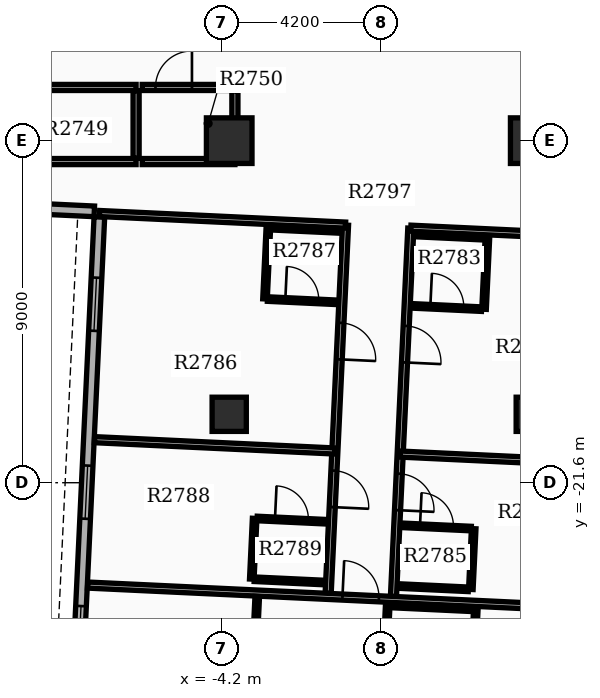
"""IFC4 building model, lengths in metres.
Left out: names, types, materials, properties, quantities, classifications, styles, units other than length and angle.
Written with IfcOpenShell. Run it as: python <this file> out.ifc"""

import sys

from ifc_helpers import new_model, si_unit, direction, frame, frame_2d, origin, origin_2d, place, context, subcontext, project, spatial, rectangle, extrude, element, fill, save


model = new_model("IFC4")
c1 = context("Model", 3, precision=1e-05, world=origin(), true_north=direction((0.0, 1.0)))
c2 = subcontext(c1, "Body", "Model", "MODEL_VIEW")
j1 = project(units=[si_unit("LENGTHUNIT", "METRE"), si_unit("PLANEANGLEUNIT", "RADIAN")], contexts=[c1])
p1 = place(None, origin())
s1 = spatial("IfcSite", under=j1, at=p1, CompositionType="ELEMENT")
p2 = place(p1, origin())
s2 = spatial("IfcBuilding", under=s1, at=p2, CompositionType="ELEMENT")
p3 = place(p2, frame((0.0, 0.0, 172.2)))
s3 = spatial("IfcBuildingStorey", under=s2, at=p3, CompositionType="ELEMENT", Elevation=172.2)
for number, where, z_axis, x_axis in (
    (1, (-4.0, -12.6, 0.0), (0.0, 0.0, 1.0), (1.0, 0.0, 0.0)),
    (2, (4.0, -12.6, 0.0), (0.0, 0.0, 1.0), (1.0, 0.0, 0.0)),
):
    element("IfcColumn", number, at=place(p3, frame(where, z_axis=z_axis, x_axis=x_axis)), inside=s3, PredefinedType="COLUMN", context=c2, shape_type="SweptSolid", body=[
        extrude(rectangle(XDim=1.2, YDim=1.2, at=origin_2d()), origin(), (0.0, 0.0, 1.0), 3.9),
    ])
for number, where, z_axis, x_axis in (
    (3, (-4.0, -19.8, 0.0), (0.0, 0.0, 1.0), (1.0, 0.0, 0.0)),
    (4, (4.0, -19.8, 0.0), (0.0, 0.0, 1.0), (1.0, 0.0, 0.0)),
):
    element("IfcColumn", number, at=place(p3, frame(where, z_axis=z_axis, x_axis=x_axis)), inside=s3, PredefinedType="COLUMN", context=c2, shape_type="SweptSolid", body=[
        extrude(rectangle(XDim=0.9, YDim=0.9, at=origin_2d()), origin(), (0.0, 0.0, 1.0), 3.9),
    ])
p4 = place(p3, frame((-7.416, -14.607, 0.0), z_axis=(0.0, 0.0, 1.0), x_axis=(-0.047103473814, -0.998890015344, 0.0)))
e5 = element("IfcWall", 5, at=p4, inside=s3, PredefinedType="STANDARD", context=c2, shape_type="SweptSolid", body=[
    extrude(rectangle(XDim=20.1, YDim=0.28, at=frame_2d((10.05, 0.0))), origin(), (0.0, 0.0, 1.0), 2.97),
])
p5 = place(p4, frame((1.6, 0.0, 0.8)))
e6 = element("IfcOpeningElement", 6, at=p5, cuts=e5, PredefinedType="OPENING", context=c2, shape_type="SweptSolid", body=[
    extrude(rectangle(XDim=1.4, YDim=1.6, at=frame_2d((0.7, 0.8))), frame((0.0, 0.15, 0.0), z_axis=(0.0, -1.0, 0.0), x_axis=(1.0, 0.0, 0.0)), (0.0, 0.0, 1.0), 0.3),
])
p6 = place(p4, frame((6.55, 0.0, 0.8)))
e7 = element("IfcOpeningElement", 7, at=p6, cuts=e5, PredefinedType="OPENING", context=c2, shape_type="SweptSolid", body=[
    extrude(rectangle(XDim=1.4, YDim=1.6, at=frame_2d((0.7, 0.8))), frame((0.0, 0.15, 0.0), z_axis=(0.0, -1.0, 0.0), x_axis=(1.0, 0.0, 0.0)), (0.0, 0.0, 1.0), 0.3),
])
p7 = place(p4, frame((10.25, 0.0, 0.8)))
e8 = element("IfcOpeningElement", 8, at=p7, cuts=e5, PredefinedType="OPENING", context=c2, shape_type="SweptSolid", body=[
    extrude(rectangle(XDim=1.4, YDim=1.6, at=frame_2d((0.7, 0.8))), frame((0.0, 0.15, 0.0), z_axis=(0.0, -1.0, 0.0), x_axis=(1.0, 0.0, 0.0)), (0.0, 0.0, 1.0), 0.3),
])
p8 = place(p4, frame((13.45, 0.0, 0.8)))
e9 = element("IfcOpeningElement", 9, at=p8, cuts=e5, PredefinedType="OPENING", context=c2, shape_type="SweptSolid", body=[
    extrude(rectangle(XDim=1.4, YDim=1.6, at=frame_2d((0.7, 0.8))), frame((0.0, 0.15, 0.0), z_axis=(0.0, -1.0, 0.0), x_axis=(1.0, 0.0, 0.0)), (0.0, 0.0, 1.0), 0.3),
])
p9 = place(p3, frame((-13.843, -14.164, 0.0), z_axis=(0.0, 0.0, 1.0), x_axis=(0.998889082162, -0.047123258997, 0.0)))
e10 = element("IfcWall", 10, at=p9, inside=s3, PredefinedType="STANDARD", context=c2, shape_type="SweptSolid", body=[
    extrude(rectangle(XDim=6.3, YDim=0.28, at=frame_2d((3.15, 0.0))), origin(), (0.0, 0.0, 1.0), 2.97),
])
p10 = place(p3, frame((-12.4, -13.15, 0.0), z_axis=(0.0, 0.0, 1.0), x_axis=(1.0, 0.0, 0.0)))
e11 = element("IfcWall", 11, at=p10, inside=s3, PredefinedType="PARTITIONING", context=c2, shape_type="SweptSolid", body=[
    extrude(rectangle(XDim=5.95, YDim=0.16, at=frame_2d((2.975, 0.0))), origin(), (0.0, 0.0, 1.0), 2.96),
])
p11 = place(p3, frame((-12.4, -11.2, 0.0), z_axis=(0.0, 0.0, 1.0), x_axis=(1.0, 0.0, 0.0)))
e12 = element("IfcWall", 12, at=p11, inside=s3, PredefinedType="PARTITIONING", context=c2, shape_type="SweptSolid", body=[
    extrude(rectangle(XDim=5.95, YDim=0.16, at=frame_2d((2.975, 0.0))), origin(), (0.0, 0.0, 1.0), 2.96),
])
p12 = place(p11, frame((2.495, 0.0, 0.0)))
e13 = element("IfcOpeningElement", 13, at=p12, cuts=e12, PredefinedType="OPENING", context=c2, shape_type="SweptSolid", body=[
    extrude(rectangle(XDim=0.96, YDim=2.15, at=frame_2d((0.48, 1.075))), frame((0.0, 0.09, 0.0), z_axis=(0.0, -1.0, 0.0), x_axis=(1.0, 0.0, 0.0)), (0.0, 0.0, 1.0), 0.18),
])
p13 = place(p3, frame((-6.45, -13.065, 0.0), z_axis=(0.0, 0.0, 1.0), x_axis=(0.0, 1.0, 0.0)))
e14 = element("IfcWall", 14, at=p13, inside=s3, PredefinedType="PARTITIONING", context=c2, shape_type="SweptSolid", body=[
    extrude(rectangle(XDim=1.78, YDim=0.16, at=frame_2d((0.89, 0.0))), origin(), (0.0, 0.0, 1.0), 2.96),
])
p14 = place(p3, frame((-6.29, -13.15, 0.0), z_axis=(0.0, 0.0, 1.0), x_axis=(1.0, 0.0, 0.0)))
e15 = element("IfcWall", 15, at=p14, inside=s3, PredefinedType="PARTITIONING", context=c2, shape_type="SweptSolid", body=[
    extrude(rectangle(XDim=2.44, YDim=0.16, at=frame_2d((1.22, 0.0))), origin(), (0.0, 0.0, 1.0), 2.96),
])
p15 = place(p3, frame((-6.29, -11.2, 0.0), z_axis=(0.0, 0.0, 1.0), x_axis=(1.0, 0.0, 0.0)))
e16 = element("IfcWall", 16, at=p15, inside=s3, PredefinedType="PARTITIONING", context=c2, shape_type="SweptSolid", body=[
    extrude(rectangle(XDim=2.44, YDim=0.16, at=frame_2d((1.22, 0.0))), origin(), (0.0, 0.0, 1.0), 2.96),
])
p16 = place(p15, frame((0.35, 0.0, 0.0)))
e17 = element("IfcOpeningElement", 17, at=p16, cuts=e16, PredefinedType="OPENING", context=c2, shape_type="SweptSolid", body=[
    extrude(rectangle(XDim=0.96, YDim=2.15, at=frame_2d((0.48, 1.075))), frame((0.0, 0.09, 0.0), z_axis=(0.0, -1.0, 0.0), x_axis=(1.0, 0.0, 0.0)), (0.0, 0.0, 1.0), 0.18),
])
p17 = place(p3, frame((-3.85, -13.065, 0.0), z_axis=(0.0, 0.0, 1.0), x_axis=(0.0, 1.0, 0.0)))
e18 = element("IfcWall", 18, at=p17, inside=s3, PredefinedType="PARTITIONING", context=c2, shape_type="SweptSolid", body=[
    extrude(rectangle(XDim=1.78, YDim=0.16, at=frame_2d((0.89, 0.0))), origin(), (0.0, 0.0, 1.0), 2.96),
])
p18 = place(p3, frame((0.779, -14.903, 0.0), z_axis=(0.0, 0.0, 1.0), x_axis=(-0.047091598416, -0.998890575268, 0.0)))
e19 = element("IfcWall", 19, at=p18, inside=s3, PredefinedType="PARTITIONING", context=c2, shape_type="SweptSolid", body=[
    extrude(rectangle(XDim=9.7, YDim=0.16, at=frame_2d((4.85, 0.0))), origin(), (0.0, 0.0, 1.0), 2.96),
])
p19 = place(p18, frame((2.575, 0.0, 0.0)))
e20 = element("IfcOpeningElement", 20, at=p19, cuts=e19, PredefinedType="OPENING", context=c2, shape_type="SweptSolid", body=[
    extrude(rectangle(XDim=0.96, YDim=2.15, at=frame_2d((0.48, 1.075))), frame((0.0, 0.09, 0.0), z_axis=(0.0, -1.0, 0.0), x_axis=(1.0, 0.0, 0.0)), (0.0, 0.0, 1.0), 0.18),
])
p20 = place(p18, frame((6.467, 0.0, 0.0)))
e21 = element("IfcOpeningElement", 21, at=p20, cuts=e19, PredefinedType="OPENING", context=c2, shape_type="SweptSolid", body=[
    extrude(rectangle(XDim=0.96, YDim=2.15, at=frame_2d((0.48, 1.075))), frame((0.0, 0.09, 0.0), z_axis=(0.0, -1.0, 0.0), x_axis=(1.0, 0.0, 0.0)), (0.0, 0.0, 1.0), 0.18),
])
p21 = place(p3, frame((0.779, -14.903, 0.0), z_axis=(0.0, 0.0, 1.0), x_axis=(0.998889957338, -0.047104703898, 0.0)))
e22 = element("IfcWall", 22, at=p21, inside=s3, PredefinedType="PARTITIONING", context=c2, shape_type="SweptSolid", body=[
    extrude(rectangle(XDim=5.24, YDim=0.16, at=frame_2d((2.62, 0.0))), origin(), (0.0, 0.0, 1.0), 2.96),
])
p22 = place(p3, frame((0.499, -20.847, 0.0), z_axis=(0.0, 0.0, 1.0), x_axis=(0.998891017342, -0.047082220362, 0.0)))
e23 = element("IfcWall", 23, at=p22, inside=s3, PredefinedType="PARTITIONING", context=c2, shape_type="SweptSolid", body=[
    extrude(rectangle(XDim=5.092, YDim=0.16, at=frame_2d((2.546, 0.0))), origin(), (0.0, 0.0, 1.0), 2.96),
])
p23 = place(p3, frame((0.823, -16.948, 0.0), z_axis=(0.0, 0.0, 1.0), x_axis=(0.998891083954, -0.047080807099, 0.0)))
e24 = element("IfcWall", 24, at=p23, inside=s3, PredefinedType="PARTITIONING", context=c2, shape_type="SweptSolid", body=[
    extrude(rectangle(XDim=1.82, YDim=0.12, at=frame_2d((0.91, 0.0))), origin(), (0.0, 0.0, 1.0), 2.96),
])
p24 = place(p23, frame((0.47, 0.0, 0.0)))
e25 = element("IfcOpeningElement", 25, at=p24, cuts=e24, PredefinedType="OPENING", context=c2, shape_type="SweptSolid", body=[
    extrude(rectangle(XDim=0.88, YDim=2.1, at=frame_2d((0.44, 1.05))), frame((0.0, 0.07, 0.0), z_axis=(0.0, -1.0, 0.0), x_axis=(1.0, 0.0, 0.0)), (0.0, 0.0, 1.0), 0.14),
])
p25 = place(p3, frame((0.911, -15.07, 0.0), z_axis=(0.0, 0.0, 1.0), x_axis=(0.998884467853, -0.047220968666, 0.0)))
e26 = element("IfcWall", 26, at=p25, inside=s3, PredefinedType="PARTITIONING", context=c2, shape_type="SweptSolid", body=[
    extrude(rectangle(XDim=1.82, YDim=0.12, at=frame_2d((0.91, 0.0))), origin(), (0.0, 0.0, 1.0), 2.96),
])
p26 = place(p3, frame((2.794, -15.158, 0.0), z_axis=(0.0, 0.0, 1.0), x_axis=(-0.04700985207, -0.998894425757, 0.0)))
e27 = element("IfcWall", 27, at=p26, inside=s3, PredefinedType="PARTITIONING", context=c2, shape_type="SweptSolid", body=[
    extrude(rectangle(XDim=1.88, YDim=0.12, at=frame_2d((0.94, 0.0))), origin(), (0.0, 0.0, 1.0), 2.96),
])
p27 = place(p3, frame((0.55, -22.721, 0.0), z_axis=(0.0, 0.0, 1.0), x_axis=(0.998891083954, -0.047080807099, 0.0)))
e28 = element("IfcWall", 28, at=p27, inside=s3, PredefinedType="PARTITIONING", context=c2, shape_type="SweptSolid", body=[
    extrude(rectangle(XDim=1.82, YDim=0.12, at=frame_2d((0.91, 0.0))), origin(), (0.0, 0.0, 1.0), 2.96),
])
p28 = place(p27, frame((0.47, 0.0, 0.0)))
e29 = element("IfcOpeningElement", 29, at=p28, cuts=e28, PredefinedType="OPENING", context=c2, shape_type="SweptSolid", body=[
    extrude(rectangle(XDim=0.88, YDim=2.1, at=frame_2d((0.44, 1.05))), frame((0.0, 0.07, 0.0), z_axis=(0.0, -1.0, 0.0), x_axis=(1.0, 0.0, 0.0)), (0.0, 0.0, 1.0), 0.14),
])
p29 = place(p3, frame((0.475, -24.319, 0.0), z_axis=(0.0, 0.0, 1.0), x_axis=(0.998891083954, -0.047080807099, 0.0)))
e30 = element("IfcWall", 30, at=p29, inside=s3, PredefinedType="PARTITIONING", context=c2, shape_type="SweptSolid", body=[
    extrude(rectangle(XDim=1.82, YDim=0.12, at=frame_2d((0.91, 0.0))), origin(), (0.0, 0.0, 1.0), 2.96),
])
p30 = place(p3, frame((2.433, -22.81, 0.0), z_axis=(0.0, 0.0, 1.0), x_axis=(-0.046992475174, -0.998895243395, 0.0)))
e31 = element("IfcWall", 31, at=p30, inside=s3, PredefinedType="PARTITIONING", context=c2, shape_type="SweptSolid", body=[
    extrude(rectangle(XDim=1.6, YDim=0.12, at=frame_2d((0.8, 0.0))), origin(), (0.0, 0.0, 1.0), 2.96),
])
p31 = place(p3, frame((-0.939, -14.822, 0.0), z_axis=(0.0, 0.0, 1.0), x_axis=(-0.047116711769, -0.99888939101, 0.0)))
e32 = element("IfcWall", 32, at=p31, inside=s3, PredefinedType="PARTITIONING", context=c2, shape_type="SweptSolid", body=[
    extrude(rectangle(XDim=9.7, YDim=0.16, at=frame_2d((4.85, 0.0))), origin(), (0.0, 0.0, 1.0), 2.96),
])
p32 = place(p31, frame((2.575, 0.0, 0.0)))
e33 = element("IfcOpeningElement", 33, at=p32, cuts=e32, PredefinedType="OPENING", context=c2, shape_type="SweptSolid", body=[
    extrude(rectangle(XDim=0.96, YDim=2.15, at=frame_2d((0.48, 1.075))), frame((0.0, 0.09, 0.0), z_axis=(0.0, -1.0, 0.0), x_axis=(1.0, 0.0, 0.0)), (0.0, 0.0, 1.0), 0.18),
])
p33 = place(p31, frame((6.467, 0.0, 0.0)))
e34 = element("IfcOpeningElement", 34, at=p33, cuts=e32, PredefinedType="OPENING", context=c2, shape_type="SweptSolid", body=[
    extrude(rectangle(XDim=0.96, YDim=2.15, at=frame_2d((0.48, 1.075))), frame((0.0, 0.09, 0.0), z_axis=(0.0, -1.0, 0.0), x_axis=(1.0, 0.0, 0.0)), (0.0, 0.0, 1.0), 0.18),
])
p34 = place(p3, frame((-0.939, -14.822, 0.0), z_axis=(0.0, 0.0, 1.0), x_axis=(-0.998890444558, 0.047094370901, 0.0)))
e35 = element("IfcWall", 35, at=p34, inside=s3, PredefinedType="PARTITIONING", context=c2, shape_type="SweptSolid", body=[
    extrude(rectangle(XDim=6.48, YDim=0.16, at=frame_2d((3.24, 0.0))), origin(), (0.0, 0.0, 1.0), 2.96),
])
p35 = place(p3, frame((-1.219, -20.766, 0.0), z_axis=(0.0, 0.0, 1.0), x_axis=(-0.998889408842, 0.047116333717, 0.0)))
e36 = element("IfcWall", 36, at=p35, inside=s3, PredefinedType="PARTITIONING", context=c2, shape_type="SweptSolid", body=[
    extrude(rectangle(XDim=6.332, YDim=0.16, at=frame_2d((3.166, 0.0))), origin(), (0.0, 0.0, 1.0), 2.96),
])
p36 = place(p3, frame((-2.993, -16.768, 0.0), z_axis=(0.0, 0.0, 1.0), x_axis=(0.998890786574, -0.047087116047, 0.0)))
e37 = element("IfcWall", 37, at=p36, inside=s3, PredefinedType="PARTITIONING", context=c2, shape_type="SweptSolid", body=[
    extrude(rectangle(XDim=1.82, YDim=0.12, at=frame_2d((0.91, 0.0))), origin(), (0.0, 0.0, 1.0), 2.96),
])
p37 = place(p36, frame((0.47, 0.0, 0.0)))
e38 = element("IfcOpeningElement", 38, at=p37, cuts=e37, PredefinedType="OPENING", context=c2, shape_type="SweptSolid", body=[
    extrude(rectangle(XDim=0.88, YDim=2.1, at=frame_2d((0.44, 1.05))), frame((0.0, 0.07, 0.0), z_axis=(0.0, -1.0, 0.0), x_axis=(1.0, 0.0, 0.0)), (0.0, 0.0, 1.0), 0.14),
])
p38 = place(p3, frame((-2.905, -14.89, 0.0), z_axis=(0.0, 0.0, 1.0), x_axis=(0.998890786574, -0.047087116047, 0.0)))
e39 = element("IfcWall", 39, at=p38, inside=s3, PredefinedType="PARTITIONING", context=c2, shape_type="SweptSolid", body=[
    extrude(rectangle(XDim=1.82, YDim=0.12, at=frame_2d((0.91, 0.0))), origin(), (0.0, 0.0, 1.0), 2.96),
])
p39 = place(p3, frame((-2.969, -14.887, 0.0), z_axis=(0.0, 0.0, 1.0), x_axis=(-0.047139425368, -0.998888319371, 0.0)))
e40 = element("IfcWall", 40, at=p39, inside=s3, PredefinedType="PARTITIONING", context=c2, shape_type="SweptSolid", body=[
    extrude(rectangle(XDim=1.88, YDim=0.12, at=frame_2d((0.94, 0.0))), origin(), (0.0, 0.0, 1.0), 2.96),
])
p40 = place(p3, frame((-3.265, -22.541, 0.0), z_axis=(0.0, 0.0, 1.0), x_axis=(0.998890786574, -0.047087116047, 0.0)))
e41 = element("IfcWall", 41, at=p40, inside=s3, PredefinedType="PARTITIONING", context=c2, shape_type="SweptSolid", body=[
    extrude(rectangle(XDim=1.82, YDim=0.12, at=frame_2d((0.91, 0.0))), origin(), (0.0, 0.0, 1.0), 2.96),
])
p41 = place(p40, frame((0.47, 0.0, 0.0)))
e42 = element("IfcOpeningElement", 42, at=p41, cuts=e41, PredefinedType="OPENING", context=c2, shape_type="SweptSolid", body=[
    extrude(rectangle(XDim=0.88, YDim=2.1, at=frame_2d((0.44, 1.05))), frame((0.0, 0.07, 0.0), z_axis=(0.0, -1.0, 0.0), x_axis=(1.0, 0.0, 0.0)), (0.0, 0.0, 1.0), 0.14),
])
p42 = place(p3, frame((-3.341, -24.139, 0.0), z_axis=(0.0, 0.0, 1.0), x_axis=(0.998890786574, -0.047087116047, 0.0)))
e43 = element("IfcWall", 43, at=p42, inside=s3, PredefinedType="PARTITIONING", context=c2, shape_type="SweptSolid", body=[
    extrude(rectangle(XDim=1.82, YDim=0.12, at=frame_2d((0.91, 0.0))), origin(), (0.0, 0.0, 1.0), 2.96),
])
p43 = place(p3, frame((-3.33, -22.538, 0.0), z_axis=(0.0, 0.0, 1.0), x_axis=(-0.047144709581, -0.998888069985, 0.0)))
e44 = element("IfcWall", 44, at=p43, inside=s3, PredefinedType="PARTITIONING", context=c2, shape_type="SweptSolid", body=[
    extrude(rectangle(XDim=1.6, YDim=0.12, at=frame_2d((0.8, 0.0))), origin(), (0.0, 0.0, 1.0), 2.96),
])
p44 = place(p3, frame((-7.725, -24.293, 0.0), z_axis=(0.0, 0.0, 1.0), x_axis=(0.998889967692, -0.047104484326, 0.0)))
e45 = element("IfcWall", 45, at=p44, inside=s3, PredefinedType="PARTITIONING", context=c2, shape_type="SweptSolid", body=[
    extrude(rectangle(XDim=13.144, YDim=0.16, at=frame_2d((6.572, 0.0))), origin(), (0.0, 0.0, 1.0), 2.96),
])
p45 = place(p44, frame((6.712, 0.0, 0.0)))
e46 = element("IfcOpeningElement", 46, at=p45, cuts=e45, PredefinedType="OPENING", context=c2, shape_type="SweptSolid", body=[
    extrude(rectangle(XDim=0.96, YDim=2.15, at=frame_2d((0.48, 1.075))), frame((0.0, 0.09, 0.0), z_axis=(0.0, -1.0, 0.0), x_axis=(1.0, 0.0, 0.0)), (0.0, 0.0, 1.0), 0.18),
])
p46 = place(p3, frame((-3.262, -24.594, 0.0), z_axis=(0.0, 0.0, 1.0), x_axis=(-0.047089343138, -0.998890681588, 0.0)))
e47 = element("IfcWall", 47, at=p46, inside=s3, PredefinedType="PARTITIONING", context=c2, shape_type="SweptSolid", body=[
    extrude(rectangle(XDim=10.312, YDim=0.12, at=frame_2d((5.156, 0.0))), origin(), (0.0, 0.0, 1.0), 2.96),
])
p47 = place(p46, frame((0.7, 0.0, 0.0)))
e48 = element("IfcOpeningElement", 48, at=p47, cuts=e47, PredefinedType="OPENING", context=c2, shape_type="SweptSolid", body=[
    extrude(rectangle(XDim=0.9, YDim=2.1, at=frame_2d((0.45, 1.05))), frame((0.0, 0.07, 0.0), z_axis=(0.0, -1.0, 0.0), x_axis=(1.0, 0.0, 0.0)), (0.0, 0.0, 1.0), 0.14),
])
p48 = place(p3, frame((0.171, -24.826, 0.0), z_axis=(0.0, 0.0, 1.0), x_axis=(-0.047087116047, -0.998890786574, 0.0)))
e49 = element("IfcWall", 49, at=p48, inside=s3, PredefinedType="PARTITIONING", context=c2, shape_type="SweptSolid", body=[
    extrude(rectangle(XDim=1.82, YDim=0.12, at=frame_2d((0.91, 0.0))), origin(), (0.0, 0.0, 1.0), 2.96),
])
p49 = place(p48, frame((0.45, 0.0, 0.0)))
e50 = element("IfcOpeningElement", 50, at=p49, cuts=e49, PredefinedType="OPENING", context=c2, shape_type="SweptSolid", body=[
    extrude(rectangle(XDim=0.88, YDim=2.1, at=frame_2d((0.44, 1.05))), frame((0.0, 0.07, 0.0), z_axis=(0.0, -1.0, 0.0), x_axis=(1.0, 0.0, 0.0)), (0.0, 0.0, 1.0), 0.14),
])
p50 = place(p3, frame((2.488, -24.935, 0.0), z_axis=(0.0, 0.0, 1.0), x_axis=(-0.047214641863, -0.998884766924, 0.0)))
e51 = element("IfcWall", 51, at=p50, inside=s3, PredefinedType="PARTITIONING", context=c2, shape_type="SweptSolid", body=[
    extrude(rectangle(XDim=1.82, YDim=0.12, at=frame_2d((0.91, 0.0))), origin(), (0.0, 0.0, 1.0), 2.96),
])
p51 = place(p3, frame((0.241, -24.829, 0.0), z_axis=(0.0, 0.0, 1.0), x_axis=(0.998887815408, -0.047150103183, 0.0)))
e52 = element("IfcWall", 52, at=p51, inside=s3, PredefinedType="PARTITIONING", context=c2, shape_type="SweptSolid", body=[
    extrude(rectangle(XDim=2.18, YDim=0.12, at=frame_2d((1.09, 0.0))), origin(), (0.0, 0.0, 1.0), 2.96),
])
p52 = place(p5, origin())
e53 = element("IfcWindow", 53, at=p52, inside=s3, PartitioningType="SINGLE_PANEL", PredefinedType="WINDOW", context=c2, shape_type="SweptSolid", body=[
    extrude(rectangle(XDim=1.4, YDim=1.6, at=frame_2d((0.7, 0.8))), frame((0.0, 0.03, 0.0), z_axis=(0.0, -1.0, 0.0), x_axis=(1.0, 0.0, 0.0)), (0.0, 0.0, 1.0), 0.06),
])
fill(e6, e53)
p53 = place(p6, origin())
e54 = element("IfcWindow", 54, at=p53, inside=s3, PartitioningType="SINGLE_PANEL", PredefinedType="WINDOW", context=c2, shape_type="SweptSolid", body=[
    extrude(rectangle(XDim=1.4, YDim=1.6, at=frame_2d((0.7, 0.8))), frame((0.0, 0.03, 0.0), z_axis=(0.0, -1.0, 0.0), x_axis=(1.0, 0.0, 0.0)), (0.0, 0.0, 1.0), 0.06),
])
fill(e7, e54)
p54 = place(p7, origin())
e55 = element("IfcWindow", 55, at=p54, inside=s3, PartitioningType="SINGLE_PANEL", PredefinedType="WINDOW", context=c2, shape_type="SweptSolid", body=[
    extrude(rectangle(XDim=1.4, YDim=1.6, at=frame_2d((0.7, 0.8))), frame((0.0, 0.03, 0.0), z_axis=(0.0, -1.0, 0.0), x_axis=(1.0, 0.0, 0.0)), (0.0, 0.0, 1.0), 0.06),
])
fill(e8, e55)
p55 = place(p16, origin())
e56 = element("IfcDoor", 56, at=p55, inside=s3, OperationType="SINGLE_SWING_RIGHT", PredefinedType="DOOR", context=c2, shape_type="SweptSolid", body=[
    extrude(rectangle(XDim=0.96, YDim=2.15, at=frame_2d((0.48, 1.075))), frame((0.0, 0.025, 0.0), z_axis=(0.0, -1.0, 0.0), x_axis=(1.0, 0.0, 0.0)), (0.0, 0.0, 1.0), 0.05),
])
fill(e17, e56)
p56 = place(p19, origin())
e57 = element("IfcDoor", 57, at=p56, inside=s3, OperationType="SINGLE_SWING_RIGHT", PredefinedType="DOOR", context=c2, shape_type="SweptSolid", body=[
    extrude(rectangle(XDim=0.96, YDim=2.15, at=frame_2d((0.48, 1.075))), frame((0.0, 0.025, 0.0), z_axis=(0.0, -1.0, 0.0), x_axis=(1.0, 0.0, 0.0)), (0.0, 0.0, 1.0), 0.05),
])
fill(e20, e57)
p57 = place(p24, origin())
e58 = element("IfcDoor", 58, at=p57, inside=s3, OperationType="SINGLE_SWING_LEFT", PredefinedType="DOOR", context=c2, shape_type="SweptSolid", body=[
    extrude(rectangle(XDim=0.88, YDim=2.1, at=frame_2d((0.44, 1.05))), frame((0.0, 0.025, 0.0), z_axis=(0.0, -1.0, 0.0), x_axis=(1.0, 0.0, 0.0)), (0.0, 0.0, 1.0), 0.05),
])
fill(e25, e58)
p58 = place(p20, origin())
e59 = element("IfcDoor", 59, at=p58, inside=s3, OperationType="SINGLE_SWING_RIGHT", PredefinedType="DOOR", context=c2, shape_type="SweptSolid", body=[
    extrude(rectangle(XDim=0.96, YDim=2.15, at=frame_2d((0.48, 1.075))), frame((0.0, 0.025, 0.0), z_axis=(0.0, -1.0, 0.0), x_axis=(1.0, 0.0, 0.0)), (0.0, 0.0, 1.0), 0.05),
])
fill(e21, e59)
p59 = place(p28, origin())
e60 = element("IfcDoor", 60, at=p59, inside=s3, OperationType="SINGLE_SWING_LEFT", PredefinedType="DOOR", context=c2, shape_type="SweptSolid", body=[
    extrude(rectangle(XDim=0.88, YDim=2.1, at=frame_2d((0.44, 1.05))), frame((0.0, 0.025, 0.0), z_axis=(0.0, -1.0, 0.0), x_axis=(1.0, 0.0, 0.0)), (0.0, 0.0, 1.0), 0.05),
])
fill(e29, e60)
p60 = place(p32, origin())
e61 = element("IfcDoor", 61, at=p60, inside=s3, OperationType="SINGLE_SWING_RIGHT", PredefinedType="DOOR", context=c2, shape_type="SweptSolid", body=[
    extrude(rectangle(XDim=0.96, YDim=2.15, at=frame_2d((0.48, 1.075))), frame((0.0, 0.025, 0.0), z_axis=(0.0, -1.0, 0.0), x_axis=(1.0, 0.0, 0.0)), (0.0, 0.0, 1.0), 0.05),
])
fill(e33, e61)
p61 = place(p37, origin())
e62 = element("IfcDoor", 62, at=p61, inside=s3, OperationType="SINGLE_SWING_LEFT", PredefinedType="DOOR", context=c2, shape_type="SweptSolid", body=[
    extrude(rectangle(XDim=0.88, YDim=2.1, at=frame_2d((0.44, 1.05))), frame((0.0, 0.025, 0.0), z_axis=(0.0, -1.0, 0.0), x_axis=(1.0, 0.0, 0.0)), (0.0, 0.0, 1.0), 0.05),
])
fill(e38, e62)
p62 = place(p33, origin())
e63 = element("IfcDoor", 63, at=p62, inside=s3, OperationType="SINGLE_SWING_RIGHT", PredefinedType="DOOR", context=c2, shape_type="SweptSolid", body=[
    extrude(rectangle(XDim=0.96, YDim=2.15, at=frame_2d((0.48, 1.075))), frame((0.0, 0.025, 0.0), z_axis=(0.0, -1.0, 0.0), x_axis=(1.0, 0.0, 0.0)), (0.0, 0.0, 1.0), 0.05),
])
fill(e34, e63)
p63 = place(p41, origin())
e64 = element("IfcDoor", 64, at=p63, inside=s3, OperationType="SINGLE_SWING_LEFT", PredefinedType="DOOR", context=c2, shape_type="SweptSolid", body=[
    extrude(rectangle(XDim=0.88, YDim=2.1, at=frame_2d((0.44, 1.05))), frame((0.0, 0.025, 0.0), z_axis=(0.0, -1.0, 0.0), x_axis=(1.0, 0.0, 0.0)), (0.0, 0.0, 1.0), 0.05),
])
fill(e42, e64)
p64 = place(p45, origin())
e65 = element("IfcDoor", 65, at=p64, inside=s3, OperationType="SINGLE_SWING_LEFT", PredefinedType="DOOR", context=c2, shape_type="SweptSolid", body=[
    extrude(rectangle(XDim=0.96, YDim=2.15, at=frame_2d((0.48, 1.075))), frame((0.0, 0.025, 0.0), z_axis=(0.0, -1.0, 0.0), x_axis=(1.0, 0.0, 0.0)), (0.0, 0.0, 1.0), 0.05),
])
fill(e46, e65)
save(model, sys.argv[1])
